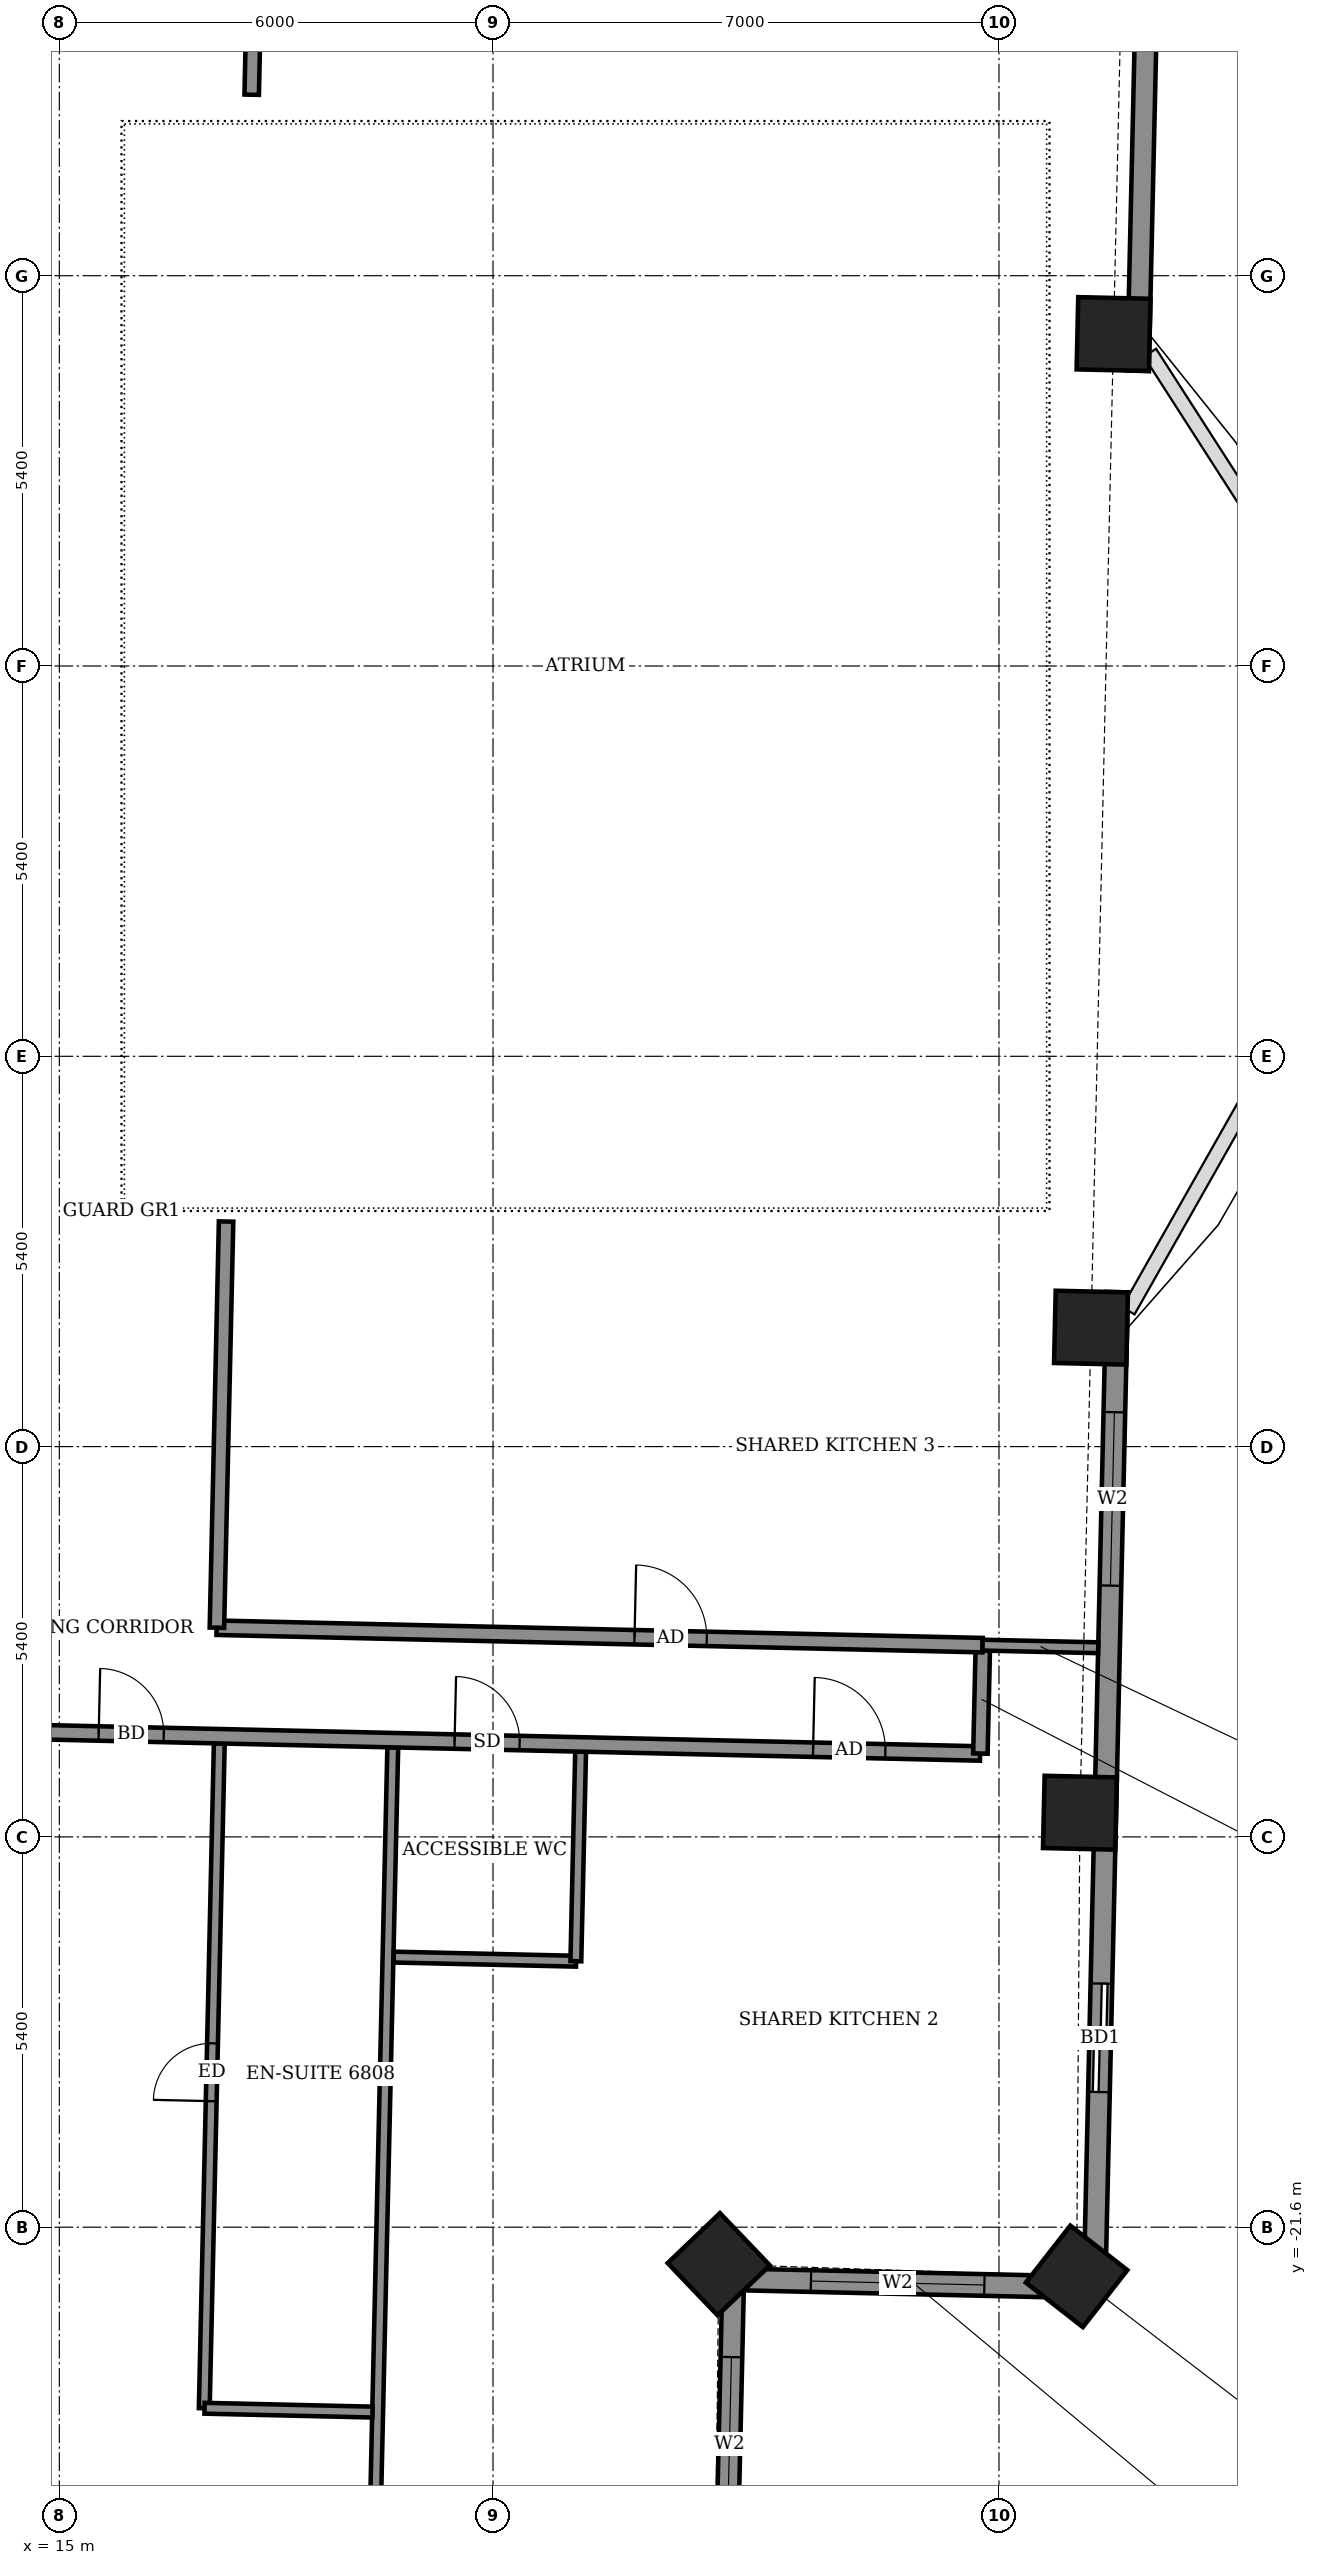
"""IFC4 building model, lengths in metres.
Left out: names, types, materials, properties, quantities, classifications, styles, units other than length and angle.
Written with IfcOpenShell. Run it as: python <this file> out.ifc"""

import sys

from ifc_helpers import new_model, si_unit, direction, frame, frame_2d, origin, origin_2d, place, context, subcontext, project, spatial, rectangle, extrude, element, fill, save


model = new_model("IFC4")
c1 = context("Model", 3, precision=1e-05, world=origin(), true_north=direction((0.0, 1.0)))
c2 = subcontext(c1, "Body", "Model", "MODEL_VIEW")
j1 = project(units=[si_unit("LENGTHUNIT", "METRE"), si_unit("PLANEANGLEUNIT", "RADIAN")], contexts=[c1])
p1 = place(None, origin())
s1 = spatial("IfcSite", under=j1, at=p1, CompositionType="ELEMENT")
p2 = place(p1, origin())
s2 = spatial("IfcBuilding", under=s1, at=p2, CompositionType="ELEMENT")
p3 = place(p2, frame((0.0, 0.0, 268.1)))
s3 = spatial("IfcBuildingStorey", under=s2, at=p3, CompositionType="ELEMENT", Elevation=268.1)
for number, where, z_axis, x_axis in (
    (1, (24.124, -22.113, -0.55), (0.0, 0.0, 1.0), (0.723, 0.691, 0.0)),
    (2, (29.074, -22.28, -0.55), (0.0, 0.0, 1.0), (0.615, 0.788, 0.0)),
    (3, (29.12, -15.866, -0.55), (0.0, 0.0, 1.0), (0.023, 1.0, 0.0)),
    (4, (29.273, -9.155, -0.55), (0.0, 0.0, 1.0), (0.023, 1.0, 0.0)),
    (5, (29.585, 4.592, -0.55), (0.0, 0.0, 1.0), (0.023, 1.0, 0.0)),
):
    element("IfcColumn", number, at=place(p3, frame(where, z_axis=z_axis, x_axis=x_axis)), inside=s3, PredefinedType="COLUMN", context=c2, shape_type="SweptSolid", body=[
        extrude(rectangle(XDim=1.0, YDim=1.0, at=origin_2d()), origin(), (0.0, 0.0, 1.0), 3.6),
    ])
p4 = place(p3, frame((29.322, -22.434, 0.0), z_axis=(0.0, 0.0, 1.0), x_axis=(0.022651350875, 0.999743425236, 0.0)))
e6 = element("IfcWall", 6, at=p4, inside=s3, PredefinedType="SOLIDWALL", context=c2, shape_type="SweptSolid", body=[
    extrude(rectangle(XDim=13.774, YDim=0.3, at=frame_2d((6.887, 0.0))), origin(), (0.0, 0.0, 1.0), 2.55),
])
p5 = place(p4, frame((2.705, 0.0, 0.0)))
e7 = element("IfcOpeningElement", 7, at=p5, cuts=e6, PredefinedType="OPENING", context=c2, shape_type="SweptSolid", body=[
    extrude(rectangle(XDim=1.5, YDim=2.4, at=frame_2d((0.75, 1.2))), frame((0.0, 0.16, 0.0), z_axis=(0.0, -1.0, 0.0), x_axis=(1.0, 0.0, 0.0)), (0.0, 0.0, 1.0), 0.32),
])
p6 = place(p4, frame((9.713, 0.0, 0.9)))
e8 = element("IfcOpeningElement", 8, at=p6, cuts=e6, PredefinedType="OPENING", context=c2, shape_type="SweptSolid", body=[
    extrude(rectangle(XDim=2.4, YDim=1.5, at=frame_2d((1.2, 0.75))), frame((0.0, 0.16, 0.0), z_axis=(0.0, -1.0, 0.0), x_axis=(1.0, 0.0, 0.0)), (0.0, 0.0, 1.0), 0.32),
])
p7 = place(p3, frame((29.923, 4.085, 0.0), z_axis=(0.0, 0.0, 1.0), x_axis=(0.022738672774, 0.999741442954, 0.0)))
e9 = element("IfcWall", 9, at=p7, inside=s3, PredefinedType="SOLIDWALL", context=c2, shape_type="SweptSolid", body=[
    extrude(rectangle(XDim=14.774, YDim=0.3, at=frame_2d((7.387, 0.0))), origin(), (0.0, 0.0, 1.0), 2.55),
])
p8 = place(p7, frame((4.853, 0.0, 0.0)))
e10 = element("IfcOpeningElement", 10, at=p8, cuts=e9, PredefinedType="OPENING", context=c2, shape_type="SweptSolid", body=[
    extrude(rectangle(XDim=1.5, YDim=2.4, at=frame_2d((0.75, 1.2))), frame((0.0, 0.16, 0.0), z_axis=(0.0, -1.0, 0.0), x_axis=(1.0, 0.0, 0.0)), (0.0, 0.0, 1.0), 0.32),
])
p9 = place(p7, frame((10.538, 0.0, 0.9)))
e11 = element("IfcOpeningElement", 11, at=p9, cuts=e9, PredefinedType="OPENING", context=c2, shape_type="SweptSolid", body=[
    extrude(rectangle(XDim=2.4, YDim=1.5, at=frame_2d((1.2, 0.75))), frame((0.0, 0.16, 0.0), z_axis=(0.0, -1.0, 0.0), x_axis=(1.0, 0.0, 0.0)), (0.0, 0.0, 1.0), 0.32),
])
p10 = place(p3, frame((24.209, -27.32, 0.0), z_axis=(0.0, 0.0, 1.0), x_axis=(0.022801259434, 0.999740017489, 0.0)))
e12 = element("IfcWall", 12, at=p10, inside=s3, PredefinedType="SOLIDWALL", context=c2, shape_type="SweptSolid", body=[
    extrude(rectangle(XDim=5.0, YDim=0.3, at=frame_2d((2.5, 0.0))), origin(), (0.0, 0.0, 1.0), 2.55),
])
p11 = place(p10, frame((1.524, 0.0, 0.9)))
e13 = element("IfcOpeningElement", 13, at=p11, cuts=e12, PredefinedType="OPENING", context=c2, shape_type="SweptSolid", body=[
    extrude(rectangle(XDim=2.4, YDim=1.5, at=frame_2d((1.2, 0.75))), frame((0.0, 0.16, 0.0), z_axis=(0.0, -1.0, 0.0), x_axis=(1.0, 0.0, 0.0)), (0.0, 0.0, 1.0), 0.32),
])
p12 = place(p3, frame((24.323, -22.321, 0.0), z_axis=(0.0, 0.0, 1.0), x_axis=(0.999744450377, -0.022606059803, 0.0)))
e14 = element("IfcWall", 14, at=p12, inside=s3, PredefinedType="SOLIDWALL", context=c2, shape_type="SweptSolid", body=[
    extrude(rectangle(XDim=5.0, YDim=0.3, at=frame_2d((2.5, 0.0))), origin(), (0.0, 0.0, 1.0), 2.55),
])
p13 = place(p12, frame((1.076, 0.0, 0.9)))
e15 = element("IfcOpeningElement", 15, at=p13, cuts=e14, PredefinedType="OPENING", context=c2, shape_type="SweptSolid", body=[
    extrude(rectangle(XDim=2.4, YDim=1.5, at=frame_2d((1.2, 0.75))), frame((0.0, 0.16, 0.0), z_axis=(0.0, -1.0, 0.0), x_axis=(1.0, 0.0, 0.0)), (0.0, 0.0, 1.0), 0.32),
])
p14 = place(p3, frame((19.338, -27.059, 0.0), z_axis=(0.0, 0.0, 1.0), x_axis=(0.022738821441, 0.999741439573, 0.0)))
e16 = element("IfcWall", 16, at=p14, inside=s3, PredefinedType="PARTITIONING", context=c2, shape_type="SweptSolid", body=[
    extrude(rectangle(XDim=12.1, YDim=0.15, at=frame_2d((6.05, 0.0))), origin(), (0.0, 0.0, 1.0), 2.55),
])
p15 = place(p3, frame((17.005, -24.105, 0.0), z_axis=(0.0, 0.0, 1.0), x_axis=(0.022611084784, 0.999744336741, 0.0)))
e17 = element("IfcWall", 17, at=p15, inside=s3, PredefinedType="PARTITIONING", context=c2, shape_type="SweptSolid", body=[
    extrude(rectangle(XDim=9.199, YDim=0.15, at=frame_2d((4.6, 0.0))), origin(), (0.0, 0.0, 1.0), 3.05),
])
p16 = place(p15, frame((4.25, 0.0, 0.0)))
e18 = element("IfcOpeningElement", 18, at=p16, cuts=e17, PredefinedType="OPENING", context=c2, shape_type="SweptSolid", body=[
    extrude(rectangle(XDim=0.8, YDim=2.1, at=frame_2d((0.4, 1.05))), frame((0.0, 0.085, 0.0), z_axis=(0.0, -1.0, 0.0), x_axis=(1.0, 0.0, 0.0)), (0.0, 0.0, 1.0), 0.17),
])
p17 = place(p3, frame((17.009, -24.105, 0.0), z_axis=(0.0, 0.0, 1.0), x_axis=(0.999740260747, -0.02279059109, 0.0)))
e19 = element("IfcWall", 19, at=p17, inside=s3, PredefinedType="PARTITIONING", context=c2, shape_type="SweptSolid", body=[
    extrude(rectangle(XDim=2.324, YDim=0.15, at=frame_2d((1.162, 0.0))), origin(), (0.0, 0.0, 1.0), 3.05),
])
p18 = place(p3, frame((19.626, -17.863, 0.0), z_axis=(0.0, 0.0, 1.0), x_axis=(0.9997461113, -0.022532486354, 0.0)))
e20 = element("IfcWall", 20, at=p18, inside=s3, PredefinedType="PARTITIONING", context=c2, shape_type="SweptSolid", body=[
    extrude(rectangle(XDim=2.525, YDim=0.15, at=frame_2d((1.262, 0.0))), origin(), (0.0, 0.0, 1.0), 3.05),
])
p19 = place(p3, frame((22.146, -17.92, 0.0), z_axis=(0.0, 0.0, 1.0), x_axis=(0.022732880677, 0.999741574676, 0.0)))
e21 = element("IfcWall", 21, at=p19, inside=s3, PredefinedType="PARTITIONING", context=c2, shape_type="SweptSolid", body=[
    extrude(rectangle(XDim=2.9, YDim=0.15, at=frame_2d((1.45, 0.0))), origin(), (0.0, 0.0, 1.0), 3.05),
])
p20 = place(p3, frame((-25.12, -13.847, 0.0), z_axis=(0.0, 0.0, 1.0), x_axis=(0.999742852445, -0.022676617578, 0.0)))
e22 = element("IfcWall", 22, at=p20, inside=s3, PredefinedType="PARTITIONING", context=c2, shape_type="SweptSolid", body=[
    extrude(rectangle(XDim=52.873, YDim=0.2, at=frame_2d((26.437, 0.0))), origin(), (0.0, 0.0, 1.0), 3.05),
])
p21 = place(p20, frame((2.43, 0.0, 0.0)))
e23 = element("IfcOpeningElement", 23, at=p21, cuts=e22, PredefinedType="OPENING", context=c2, shape_type="SweptSolid", body=[
    extrude(rectangle(XDim=1.0, YDim=2.1, at=frame_2d((0.5, 1.05))), frame((0.0, 0.11, 0.0), z_axis=(0.0, -1.0, 0.0), x_axis=(1.0, 0.0, 0.0)), (0.0, 0.0, 1.0), 0.22),
])
p22 = place(p20, frame((10.325, 0.0, 0.0)))
e24 = element("IfcOpeningElement", 24, at=p22, cuts=e22, PredefinedType="OPENING", context=c2, shape_type="SweptSolid", body=[
    extrude(rectangle(XDim=0.9, YDim=2.1, at=frame_2d((0.45, 1.05))), frame((0.0, 0.11, 0.0), z_axis=(0.0, -1.0, 0.0), x_axis=(1.0, 0.0, 0.0)), (0.0, 0.0, 1.0), 0.22),
])
p23 = place(p20, frame((12.575, 0.0, 0.0)))
e25 = element("IfcOpeningElement", 25, at=p23, cuts=e22, PredefinedType="OPENING", context=c2, shape_type="SweptSolid", body=[
    extrude(rectangle(XDim=0.9, YDim=2.1, at=frame_2d((0.45, 1.05))), frame((0.0, 0.11, 0.0), z_axis=(0.0, -1.0, 0.0), x_axis=(1.0, 0.0, 0.0)), (0.0, 0.0, 1.0), 0.22),
])
p24 = place(p20, frame((19.45, 0.0, 0.0)))
e26 = element("IfcOpeningElement", 26, at=p24, cuts=e22, PredefinedType="OPENING", context=c2, shape_type="SweptSolid", body=[
    extrude(rectangle(XDim=0.9, YDim=2.1, at=frame_2d((0.45, 1.05))), frame((0.0, 0.11, 0.0), z_axis=(0.0, -1.0, 0.0), x_axis=(1.0, 0.0, 0.0)), (0.0, 0.0, 1.0), 0.22),
])
p25 = place(p20, frame((21.625, 0.0, 0.0)))
e27 = element("IfcOpeningElement", 27, at=p25, cuts=e22, PredefinedType="OPENING", context=c2, shape_type="SweptSolid", body=[
    extrude(rectangle(XDim=0.9, YDim=2.1, at=frame_2d((0.45, 1.05))), frame((0.0, 0.11, 0.0), z_axis=(0.0, -1.0, 0.0), x_axis=(1.0, 0.0, 0.0)), (0.0, 0.0, 1.0), 0.22),
])
p26 = place(p20, frame((28.575, 0.0, 0.0)))
e28 = element("IfcOpeningElement", 28, at=p26, cuts=e22, PredefinedType="OPENING", context=c2, shape_type="SweptSolid", body=[
    extrude(rectangle(XDim=0.9, YDim=2.1, at=frame_2d((0.45, 1.05))), frame((0.0, 0.11, 0.0), z_axis=(0.0, -1.0, 0.0), x_axis=(1.0, 0.0, 0.0)), (0.0, 0.0, 1.0), 0.22),
])
p27 = place(p20, frame((30.875, 0.0, 0.0)))
e29 = element("IfcOpeningElement", 29, at=p27, cuts=e22, PredefinedType="OPENING", context=c2, shape_type="SweptSolid", body=[
    extrude(rectangle(XDim=0.9, YDim=2.1, at=frame_2d((0.45, 1.05))), frame((0.0, 0.11, 0.0), z_axis=(0.0, -1.0, 0.0), x_axis=(1.0, 0.0, 0.0)), (0.0, 0.0, 1.0), 0.22),
])
p28 = place(p20, frame((38.175, 0.0, 0.0)))
e30 = element("IfcOpeningElement", 30, at=p28, cuts=e22, PredefinedType="OPENING", context=c2, shape_type="SweptSolid", body=[
    extrude(rectangle(XDim=0.9, YDim=2.1, at=frame_2d((0.45, 1.05))), frame((0.0, 0.11, 0.0), z_axis=(0.0, -1.0, 0.0), x_axis=(1.0, 0.0, 0.0)), (0.0, 0.0, 1.0), 0.22),
])
p29 = place(p20, frame((40.675, 0.0, 0.0)))
e31 = element("IfcOpeningElement", 31, at=p29, cuts=e22, PredefinedType="OPENING", context=c2, shape_type="SweptSolid", body=[
    extrude(rectangle(XDim=0.9, YDim=2.1, at=frame_2d((0.45, 1.05))), frame((0.0, 0.11, 0.0), z_axis=(0.0, -1.0, 0.0), x_axis=(1.0, 0.0, 0.0)), (0.0, 0.0, 1.0), 0.22),
])
p30 = place(p20, frame((50.561, 0.0, 0.0)))
e32 = element("IfcOpeningElement", 32, at=p30, cuts=e22, PredefinedType="OPENING", context=c2, shape_type="SweptSolid", body=[
    extrude(rectangle(XDim=1.0, YDim=2.1, at=frame_2d((0.5, 1.05))), frame((0.0, 0.11, 0.0), z_axis=(0.0, -1.0, 0.0), x_axis=(1.0, 0.0, 0.0)), (0.0, 0.0, 1.0), 0.22),
])
p31 = place(p20, frame((45.6, 0.0, 0.0)))
e33 = element("IfcOpeningElement", 33, at=p31, cuts=e22, PredefinedType="OPENING", context=c2, shape_type="SweptSolid", body=[
    extrude(rectangle(XDim=0.9, YDim=2.1, at=frame_2d((0.45, 1.05))), frame((0.0, 0.11, 0.0), z_axis=(0.0, -1.0, 0.0), x_axis=(1.0, 0.0, 0.0)), (0.0, 0.0, 1.0), 0.22),
])
p32 = place(p3, frame((27.743, -15.047, 0.0), z_axis=(0.0, 0.0, 1.0), x_axis=(0.022780545013, 0.999740489712, 0.0)))
e34 = element("IfcWall", 34, at=p32, inside=s3, PredefinedType="PARTITIONING", context=c2, shape_type="SweptSolid", body=[
    extrude(rectangle(XDim=1.5, YDim=0.2, at=frame_2d((0.75, 0.0))), origin(), (0.0, 0.0, 1.0), 3.05),
])
p33 = place(p3, frame((17.176, -13.306, 0.0), z_axis=(0.0, 0.0, 1.0), x_axis=(0.999741038234, -0.022756459988, 0.0)))
e35 = element("IfcWall", 35, at=p33, inside=s3, PredefinedType="PARTITIONING", context=c2, shape_type="SweptSolid", body=[
    extrude(rectangle(XDim=10.6, YDim=0.2, at=frame_2d((5.3, 0.0))), origin(), (0.0, 0.0, 1.0), 3.05),
])
p34 = place(p33, frame((5.783, 0.0, 0.0)))
e36 = element("IfcOpeningElement", 36, at=p34, cuts=e35, PredefinedType="OPENING", context=c2, shape_type="SweptSolid", body=[
    extrude(rectangle(XDim=1.0, YDim=2.1, at=frame_2d((0.5, 1.05))), frame((0.0, 0.11, 0.0), z_axis=(0.0, -1.0, 0.0), x_axis=(1.0, 0.0, 0.0)), (0.0, 0.0, 1.0), 0.22),
])
p35 = place(p3, frame((17.18, -13.306, 0.0), z_axis=(0.0, 0.0, 1.0), x_axis=(0.022584272568, 0.999744942789, 0.0)))
e37 = element("IfcWall", 37, at=p35, inside=s3, PredefinedType="PARTITIONING", context=c2, shape_type="SweptSolid", body=[
    extrude(rectangle(XDim=5.621, YDim=0.2, at=frame_2d((2.811, 0.0))), origin(), (0.0, 0.0, 1.0), 3.05),
])
p36 = place(p3, frame((27.773, -13.547, 0.0), z_axis=(0.0, 0.0, 1.0), x_axis=(0.999748563699, -0.022423411484, 0.0)))
e38 = element("IfcWall", 38, at=p36, inside=s3, PredefinedType="PARTITIONING", context=c2, shape_type="SweptSolid", body=[
    extrude(rectangle(XDim=1.601, YDim=0.15, at=frame_2d((0.8, 0.0))), origin(), (0.0, 0.0, 1.0), 2.55),
])
p37 = place(p3, frame((17.661, 7.904, 0.0), z_axis=(0.0, 0.0, 1.0), x_axis=(0.022718785711, 0.999741895079, 0.0)))
e39 = element("IfcWall", 39, at=p37, inside=s3, PredefinedType="PARTITIONING", context=c2, shape_type="SweptSolid", body=[
    extrude(rectangle(XDim=4.234, YDim=0.2, at=frame_2d((2.117, 0.0))), origin(), (0.0, 0.0, 1.0), 3.05),
])
p38 = place(p5, origin())
e40 = element("IfcDoor", 40, at=p38, inside=s3, OperationType="SLIDING_TO_LEFT", PredefinedType="DOOR", context=c2, shape_type="SweptSolid", body=[
    extrude(rectangle(XDim=1.5, YDim=2.4, at=frame_2d((0.75, 1.2))), frame((0.0, 0.025, 0.0), z_axis=(0.0, -1.0, 0.0), x_axis=(1.0, 0.0, 0.0)), (0.0, 0.0, 1.0), 0.05),
])
fill(e7, e40)
p39 = place(p6, origin())
e41 = element("IfcWindow", 41, at=p39, inside=s3, PartitioningType="DOUBLE_PANEL_VERTICAL", PredefinedType="WINDOW", context=c2, shape_type="SweptSolid", body=[
    extrude(rectangle(XDim=2.4, YDim=1.5, at=frame_2d((1.2, 0.75))), frame((0.0, 0.03, 0.0), z_axis=(0.0, -1.0, 0.0), x_axis=(1.0, 0.0, 0.0)), (0.0, 0.0, 1.0), 0.06),
])
fill(e8, e41)
p40 = place(p11, origin())
e42 = element("IfcWindow", 42, at=p40, inside=s3, PartitioningType="DOUBLE_PANEL_VERTICAL", PredefinedType="WINDOW", context=c2, shape_type="SweptSolid", body=[
    extrude(rectangle(XDim=2.4, YDim=1.5, at=frame_2d((1.2, 0.75))), frame((0.0, 0.03, 0.0), z_axis=(0.0, -1.0, 0.0), x_axis=(1.0, 0.0, 0.0)), (0.0, 0.0, 1.0), 0.06),
])
fill(e13, e42)
p41 = place(p13, origin())
e43 = element("IfcWindow", 43, at=p41, inside=s3, PartitioningType="DOUBLE_PANEL_VERTICAL", PredefinedType="WINDOW", context=c2, shape_type="SweptSolid", body=[
    extrude(rectangle(XDim=2.4, YDim=1.5, at=frame_2d((1.2, 0.75))), frame((0.0, 0.03, 0.0), z_axis=(0.0, -1.0, 0.0), x_axis=(1.0, 0.0, 0.0)), (0.0, 0.0, 1.0), 0.06),
])
fill(e15, e43)
p42 = place(p29, origin())
e44 = element("IfcDoor", 44, at=p42, inside=s3, OperationType="SINGLE_SWING_RIGHT", PredefinedType="DOOR", context=c2, shape_type="SweptSolid", body=[
    extrude(rectangle(XDim=0.9, YDim=2.1, at=frame_2d((0.45, 1.05))), frame((0.0, 0.025, 0.0), z_axis=(0.0, -1.0, 0.0), x_axis=(1.0, 0.0, 0.0)), (0.0, 0.0, 1.0), 0.05),
])
fill(e31, e44)
p43 = place(p16, origin())
e45 = element("IfcDoor", 45, at=p43, inside=s3, OperationType="SINGLE_SWING_RIGHT", PredefinedType="DOOR", context=c2, shape_type="SweptSolid", body=[
    extrude(rectangle(XDim=0.8, YDim=2.1, at=frame_2d((0.4, 1.05))), frame((0.0, 0.025, 0.0), z_axis=(0.0, -1.0, 0.0), x_axis=(1.0, 0.0, 0.0)), (0.0, 0.0, 1.0), 0.05),
])
fill(e18, e45)
p44 = place(p30, origin())
e46 = element("IfcDoor", 46, at=p44, inside=s3, OperationType="SINGLE_SWING_RIGHT", PredefinedType="DOOR", context=c2, shape_type="SweptSolid", body=[
    extrude(rectangle(XDim=1.0, YDim=2.1, at=frame_2d((0.5, 1.05))), frame((0.0, 0.025, 0.0), z_axis=(0.0, -1.0, 0.0), x_axis=(1.0, 0.0, 0.0)), (0.0, 0.0, 1.0), 0.05),
])
fill(e32, e46)
p45 = place(p31, origin())
e47 = element("IfcDoor", 47, at=p45, inside=s3, OperationType="SINGLE_SWING_LEFT", PredefinedType="DOOR", context=c2, shape_type="SweptSolid", body=[
    extrude(rectangle(XDim=0.9, YDim=2.1, at=frame_2d((0.45, 1.05))), frame((0.0, 0.025, 0.0), z_axis=(0.0, -1.0, 0.0), x_axis=(1.0, 0.0, 0.0)), (0.0, 0.0, 1.0), 0.05),
])
fill(e33, e47)
p46 = place(p34, origin())
e48 = element("IfcDoor", 48, at=p46, inside=s3, OperationType="SINGLE_SWING_LEFT", PredefinedType="DOOR", context=c2, shape_type="SweptSolid", body=[
    extrude(rectangle(XDim=1.0, YDim=2.1, at=frame_2d((0.5, 1.05))), frame((0.0, 0.025, 0.0), z_axis=(0.0, -1.0, 0.0), x_axis=(1.0, 0.0, 0.0)), (0.0, 0.0, 1.0), 0.05),
])
fill(e36, e48)
save(model, sys.argv[1])
